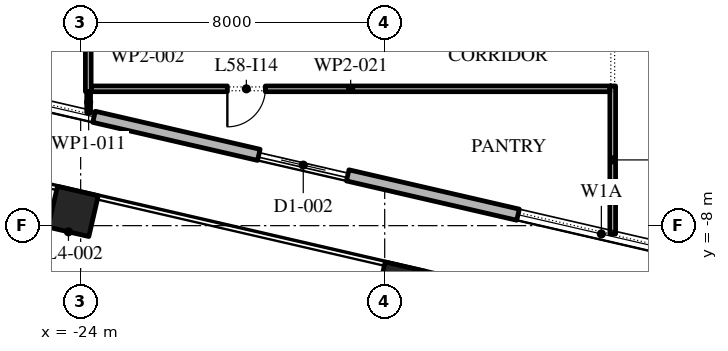
"""IFC4 building model, lengths in metres.
Left out: names, types, materials, properties, quantities, classifications, styles, units other than length and angle.
Written with IfcOpenShell. Run it as: python <this file> out.ifc"""

import sys

from ifc_helpers import new_model, si_unit, direction, frame, frame_2d, origin, origin_2d, place, context, subcontext, project, spatial, rectangle, extrude, element, fill, save


model = new_model("IFC4")
c1 = context("Model", 3, precision=1e-05, world=origin(), true_north=direction((0.0, 1.0)))
c2 = subcontext(c1, "Body", "Model", "MODEL_VIEW")
j1 = project(units=[si_unit("LENGTHUNIT", "METRE"), si_unit("PLANEANGLEUNIT", "RADIAN")], contexts=[c1])
p1 = place(None, origin())
s1 = spatial("IfcSite", under=j1, at=p1, CompositionType="ELEMENT")
p2 = place(p1, origin())
s2 = spatial("IfcBuilding", under=s1, at=p2, CompositionType="ELEMENT")
p3 = place(p2, frame((0.0, 0.0, 268.2)))
s3 = spatial("IfcBuildingStorey", under=s2, at=p3, CompositionType="ELEMENT", Elevation=268.2)
for number, where, z_axis, x_axis in (
    (1, (-24.197, -7.626, 0.0), (0.0, 0.0, 1.0), (0.974, -0.225, 0.0)),
    (2, (-15.574, -9.617, 0.0), (0.0, 0.0, 1.0), (0.974, -0.225, 0.0)),
):
    element("IfcColumn", number, at=place(p3, frame(where, z_axis=z_axis, x_axis=x_axis)), inside=s3, PredefinedType="COLUMN", context=c2, shape_type="SweptSolid", body=[
        extrude(rectangle(XDim=1.1, YDim=1.1, at=origin_2d()), origin(), (0.0, 0.0, 1.0), 4.2),
    ])
p4 = place(p3, frame((-29.616, -3.758, 0.0), z_axis=(0.0, 0.0, 1.0), x_axis=(0.974370532314, -0.224949029246, 0.0)))
e3 = element("IfcWall", 3, at=p4, inside=s3, PredefinedType="STANDARD", context=c2, shape_type="SweptSolid", body=[
    extrude(rectangle(XDim=48.0, YDim=0.3, at=frame_2d((24.0, 0.0))), origin(), (0.0, 0.0, 1.0), 4.0),
])
p5 = place(p4, frame((1.625, 0.0, 0.45)))
e4 = element("IfcOpeningElement", 4, at=p5, cuts=e3, PredefinedType="OPENING", context=c2, shape_type="SweptSolid", body=[
    extrude(rectangle(XDim=4.5, YDim=3.05, at=frame_2d((2.25, 1.525))), frame((0.0, 0.16, 0.0), z_axis=(0.0, -1.0, 0.0), x_axis=(1.0, 0.0, 0.0)), (0.0, 0.0, 1.0), 0.32),
])
p6 = place(p4, frame((10.575, 0.0, 0.0)))
e5 = element("IfcOpeningElement", 5, at=p6, cuts=e3, PredefinedType="OPENING", context=c2, shape_type="SweptSolid", body=[
    extrude(rectangle(XDim=2.4, YDim=3.5, at=frame_2d((1.2, 1.75))), frame((0.0, 0.16, 0.0), z_axis=(0.0, -1.0, 0.0), x_axis=(1.0, 0.0, 0.0)), (0.0, 0.0, 1.0), 0.32),
])
p7 = place(p4, frame((17.575, 0.0, 0.45)))
e6 = element("IfcOpeningElement", 6, at=p7, cuts=e3, PredefinedType="OPENING", context=c2, shape_type="SweptSolid", body=[
    extrude(rectangle(XDim=4.5, YDim=3.0, at=frame_2d((2.25, 1.5))), frame((0.0, 0.16, 0.0), z_axis=(0.0, -1.0, 0.0), x_axis=(1.0, 0.0, 0.0)), (0.0, 0.0, 1.0), 0.32),
])
p8 = place(p4, frame((25.625, 0.0, 0.45)))
e7 = element("IfcOpeningElement", 7, at=p8, cuts=e3, PredefinedType="OPENING", context=c2, shape_type="SweptSolid", body=[
    extrude(rectangle(XDim=4.5, YDim=2.95, at=frame_2d((2.25, 1.475))), frame((0.0, 0.16, 0.0), z_axis=(0.0, -1.0, 0.0), x_axis=(1.0, 0.0, 0.0)), (0.0, 0.0, 1.0), 0.32),
])
p9 = place(p4, frame((33.675, 0.0, 0.45)))
e8 = element("IfcOpeningElement", 8, at=p9, cuts=e3, PredefinedType="OPENING", context=c2, shape_type="SweptSolid", body=[
    extrude(rectangle(XDim=4.5, YDim=2.825, at=frame_2d((2.25, 1.413))), frame((0.0, 0.16, 0.0), z_axis=(0.0, -1.0, 0.0), x_axis=(1.0, 0.0, 0.0)), (0.0, 0.0, 1.0), 0.32),
])
p10 = place(p4, frame((42.175, 0.0, 0.0)))
e9 = element("IfcOpeningElement", 9, at=p10, cuts=e3, PredefinedType="OPENING", context=c2, shape_type="SweptSolid", body=[
    extrude(rectangle(XDim=2.4, YDim=3.5, at=frame_2d((1.2, 1.75))), frame((0.0, 0.16, 0.0), z_axis=(0.0, -1.0, 0.0), x_axis=(1.0, 0.0, 0.0)), (0.0, 0.0, 1.0), 0.32),
])
p11 = place(p3, frame((-23.8, -4.475, 0.0), z_axis=(0.0, 0.0, 1.0), x_axis=(0.0, 1.0, 0.0)))
e10 = element("IfcWall", 10, at=p11, inside=s3, PredefinedType="PARTITIONING", context=c2, shape_type="SweptSolid", body=[
    extrude(rectangle(XDim=4.935, YDim=0.15, at=frame_2d((2.468, 0.0))), origin(), (0.0, 0.0, 1.0), 4.0),
])
p12 = place(p11, frame((1.485, 0.0, 0.0)))
e11 = element("IfcOpeningElement", 11, at=p12, cuts=e10, PredefinedType="OPENING", context=c2, shape_type="SweptSolid", body=[
    extrude(rectangle(XDim=1.0, YDim=2.1, at=frame_2d((0.5, 1.05))), frame((0.0, 0.085, 0.0), z_axis=(0.0, -1.0, 0.0), x_axis=(1.0, 0.0, 0.0)), (0.0, 0.0, 1.0), 0.17),
])
p13 = place(p3, frame((-23.79, -5.032, 0.0), z_axis=(0.0, 0.0, 1.0), x_axis=(0.0, 1.0, 0.0)))
e12 = element("IfcWall", 12, at=p13, inside=s3, PredefinedType="PARTITIONING", context=c2, shape_type="SweptSolid", body=[
    extrude(rectangle(XDim=0.557, YDim=0.1, at=frame_2d((0.278, 0.0))), origin(), (0.0, 0.0, 1.0), 4.0),
])
p14 = place(p3, frame((-10.0, -8.216, 0.0), z_axis=(0.0, 0.0, 1.0), x_axis=(0.0, 1.0, 0.0)))
e13 = element("IfcWall", 13, at=p14, inside=s3, PredefinedType="PARTITIONING", context=c2, shape_type="SweptSolid", body=[
    extrude(rectangle(XDim=3.891, YDim=0.15, at=frame_2d((1.946, 0.0))), origin(), (0.0, 0.0, 1.0), 4.0),
])
p15 = place(p3, frame((-10.075, -4.4, 0.0), z_axis=(0.0, 0.0, 1.0), x_axis=(-1.0, 0.0, 0.0)))
e14 = element("IfcWall", 14, at=p15, inside=s3, PredefinedType="PARTITIONING", context=c2, shape_type="SweptSolid", body=[
    extrude(rectangle(XDim=13.64, YDim=0.15, at=frame_2d((6.82, 0.0))), origin(), (0.0, 0.0, 1.0), 4.0),
])
p16 = place(p15, frame((9.065, 0.0, 0.0)))
e15 = element("IfcOpeningElement", 15, at=p16, cuts=e14, PredefinedType="OPENING", context=c2, shape_type="SweptSolid", body=[
    extrude(rectangle(XDim=1.0, YDim=2.1, at=frame_2d((0.5, 1.05))), frame((0.0, 0.085, 0.0), z_axis=(0.0, -1.0, 0.0), x_axis=(1.0, 0.0, 0.0)), (0.0, 0.0, 1.0), 0.17),
])
p17 = place(p5, origin())
e16 = element("IfcWindow", 16, at=p17, inside=s3, PartitioningType="DOUBLE_PANEL_VERTICAL", PredefinedType="WINDOW", context=c2, shape_type="SweptSolid", body=[
    extrude(rectangle(XDim=4.5, YDim=3.05, at=frame_2d((2.25, 1.525))), frame((0.0, 0.03, 0.0), z_axis=(0.0, -1.0, 0.0), x_axis=(1.0, 0.0, 0.0)), (0.0, 0.0, 1.0), 0.06),
])
fill(e4, e16)
p18 = place(p6, origin())
e17 = element("IfcDoor", 17, at=p18, inside=s3, OperationType="DOUBLE_DOOR_SLIDING", PredefinedType="DOOR", context=c2, shape_type="SweptSolid", body=[
    extrude(rectangle(XDim=2.4, YDim=3.5, at=frame_2d((1.2, 1.75))), frame((0.0, 0.025, 0.0), z_axis=(0.0, -1.0, 0.0), x_axis=(1.0, 0.0, 0.0)), (0.0, 0.0, 1.0), 0.05),
])
fill(e5, e17)
p19 = place(p7, origin())
e18 = element("IfcWindow", 18, at=p19, inside=s3, PartitioningType="DOUBLE_PANEL_VERTICAL", PredefinedType="WINDOW", context=c2, shape_type="SweptSolid", body=[
    extrude(rectangle(XDim=4.5, YDim=3.0, at=frame_2d((2.25, 1.5))), frame((0.0, 0.03, 0.0), z_axis=(0.0, -1.0, 0.0), x_axis=(1.0, 0.0, 0.0)), (0.0, 0.0, 1.0), 0.06),
])
fill(e6, e18)
p20 = place(p16, origin())
e19 = element("IfcDoor", 19, at=p20, inside=s3, OperationType="SINGLE_SWING_LEFT", PredefinedType="DOOR", context=c2, shape_type="SweptSolid", body=[
    extrude(rectangle(XDim=1.0, YDim=2.1, at=frame_2d((0.5, 1.05))), frame((0.0, 0.025, 0.0), z_axis=(0.0, -1.0, 0.0), x_axis=(1.0, 0.0, 0.0)), (0.0, 0.0, 1.0), 0.05),
])
fill(e15, e19)
save(model, sys.argv[1])
